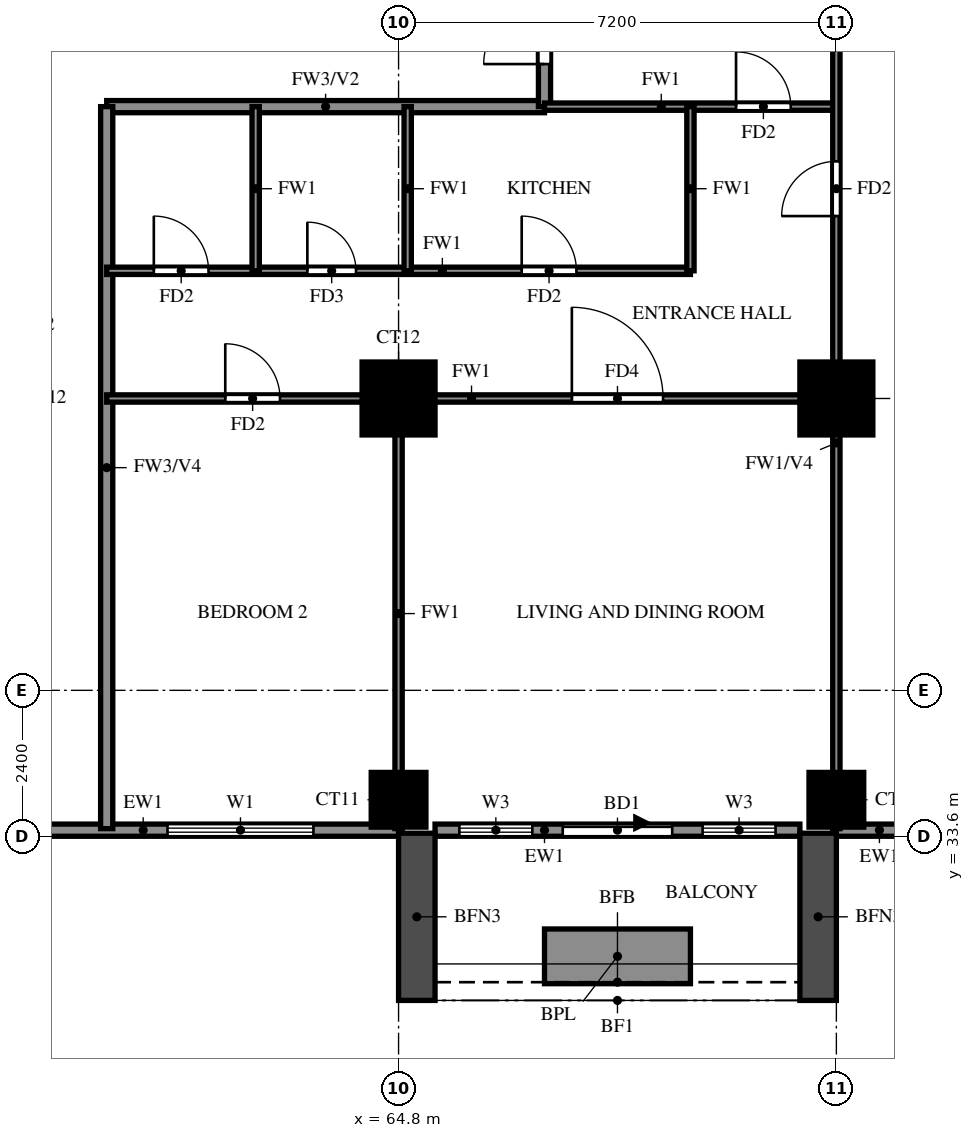
"""IFC4 building model, lengths in metres.
Left out: names, types, materials, properties, quantities, classifications, styles, units other than length and angle.
Written with IfcOpenShell. Run it as: python <this file> out.ifc"""

import sys

from ifc_helpers import new_model, si_unit, direction, frame, frame_2d, origin, origin_2d, place, context, subcontext, project, spatial, rectangle, extrude, source, transform, mapped, element, fill, save


model = new_model("IFC4")
c1 = context("Model", 3, precision=1e-05, world=origin(), true_north=direction((0.0, 1.0)))
c2 = subcontext(c1, "Body", "Model", "MODEL_VIEW")
j1 = project(units=[si_unit("LENGTHUNIT", "METRE"), si_unit("PLANEANGLEUNIT", "RADIAN")], contexts=[c1])
p1 = place(None, origin())
s1 = spatial("IfcSite", under=j1, at=p1, CompositionType="ELEMENT")
p2 = place(p1, origin())
s2 = spatial("IfcBuilding", under=s1, at=p2, CompositionType="ELEMENT")
p3 = place(p2, frame((0.0, 0.0, 93.5)))
s3 = spatial("IfcBuildingStorey", under=s2, at=p3, CompositionType="ELEMENT", Elevation=93.5)
m1 = source(origin(), c2, "Body", "SweptSolid", [
    extrude(rectangle(XDim=0.9, YDim=0.9, at=origin_2d()), origin(), (0.0, 0.0, 1.0), 3.18),
])
for number, where, z_axis, x_axis in (
    (1, (64.8, 34.2, 0.0), (0.0, 0.0, 1.0), (1.0, 0.0, 0.0)),
    (2, (72.0, 34.2, 0.0), (0.0, 0.0, 1.0), (1.0, 0.0, 0.0)),
):
    element("IfcColumn", number, at=place(p3, frame(where, z_axis=z_axis, x_axis=x_axis)), inside=s3, PredefinedType="COLUMN", context=c2, shape_type="MappedRepresentation", body=[
        mapped(m1, transform((0.0, 0.0, 0.0))),
    ])
m2 = source(origin(), c2, "Body", "SweptSolid", [
    extrude(rectangle(XDim=1.2, YDim=1.2, at=origin_2d()), origin(), (0.0, 0.0, 1.0), 3.18),
])
for number, where, z_axis, x_axis in (
    (3, (64.8, 40.8, 0.0), (0.0, 0.0, 1.0), (1.0, 0.0, 0.0)),
    (4, (72.0, 40.8, 0.0), (0.0, 0.0, 1.0), (1.0, 0.0, 0.0)),
):
    element("IfcColumn", number, at=place(p3, frame(where, z_axis=z_axis, x_axis=x_axis)), inside=s3, PredefinedType="COLUMN", context=c2, shape_type="MappedRepresentation", body=[
        mapped(m2, transform((0.0, 0.0, 0.0))),
    ])
p4 = place(p3, frame((85.996, 33.863, 0.0), z_axis=(0.0, 0.0, 1.0), x_axis=(-0.707100718496, 0.707112843825, 0.0)))
e5 = element("IfcWall", 5, at=p4, inside=s3, PredefinedType="SOLIDWALL", context=c2, shape_type="SweptSolid", body=[
    extrude(rectangle(XDim=20.135, YDim=0.2, at=frame_2d((10.067, 0.0))), origin(), (0.0, 0.0, 1.0), 3.18),
])
p5 = place(p3, frame((58.8, 33.7, 0.0), z_axis=(0.0, 0.0, 1.0), x_axis=(1.0, 0.0, 0.0)))
e6 = element("IfcWall", 6, at=p5, inside=s3, PredefinedType="SOLIDWALL", context=c2, shape_type="SweptSolid", body=[
    extrude(rectangle(XDim=6.0, YDim=0.2, at=frame_2d((3.0, 0.0))), origin(), (0.0, 0.0, 1.0), 3.18),
])
p6 = place(p5, frame((2.2, 0.0, 0.6)))
e7 = element("IfcOpeningElement", 7, at=p6, cuts=e6, PredefinedType="OPENING", context=c2, shape_type="SweptSolid", body=[
    extrude(rectangle(XDim=2.4, YDim=2.4, at=frame_2d((1.2, 1.2))), frame((0.0, 0.11, 0.0), z_axis=(0.0, -1.0, 0.0), x_axis=(1.0, 0.0, 0.0)), (0.0, 0.0, 1.0), 0.22),
])
p7 = place(p3, frame((65.4, 33.7, 0.0), z_axis=(0.0, 0.0, 1.0), x_axis=(1.0, 0.0, 0.0)))
e8 = element("IfcWall", 8, at=p7, inside=s3, PredefinedType="SOLIDWALL", context=c2, shape_type="SweptSolid", body=[
    extrude(rectangle(XDim=6.0, YDim=0.2, at=frame_2d((3.0, 0.0))), origin(), (0.0, 0.0, 1.0), 3.18),
])
p8 = place(p7, frame((2.1, 0.0, 0.0)))
e9 = element("IfcOpeningElement", 9, at=p8, cuts=e8, PredefinedType="OPENING", context=c2, shape_type="SweptSolid", body=[
    extrude(rectangle(XDim=1.8, YDim=2.4, at=frame_2d((0.9, 1.2))), frame((0.0, 0.11, 0.0), z_axis=(0.0, -1.0, 0.0), x_axis=(1.0, 0.0, 0.0)), (0.0, 0.0, 1.0), 0.22),
])
p9 = place(p7, frame((0.4, 0.0, 0.6)))
e10 = element("IfcOpeningElement", 10, at=p9, cuts=e8, PredefinedType="OPENING", context=c2, shape_type="SweptSolid", body=[
    extrude(rectangle(XDim=1.2, YDim=2.4, at=frame_2d((0.6, 1.2))), frame((0.0, 0.11, 0.0), z_axis=(0.0, -1.0, 0.0), x_axis=(1.0, 0.0, 0.0)), (0.0, 0.0, 1.0), 0.22),
])
p10 = place(p7, frame((4.4, 0.0, 0.6)))
e11 = element("IfcOpeningElement", 11, at=p10, cuts=e8, PredefinedType="OPENING", context=c2, shape_type="SweptSolid", body=[
    extrude(rectangle(XDim=1.2, YDim=2.4, at=frame_2d((0.6, 1.2))), frame((0.0, 0.11, 0.0), z_axis=(0.0, -1.0, 0.0), x_axis=(1.0, 0.0, 0.0)), (0.0, 0.0, 1.0), 0.22),
])
p11 = place(p3, frame((72.0, 33.7, 0.0), z_axis=(0.0, 0.0, 1.0), x_axis=(1.0, 0.0, 0.0)))
e12 = element("IfcWall", 12, at=p11, inside=s3, PredefinedType="SOLIDWALL", context=c2, shape_type="SweptSolid", body=[
    extrude(rectangle(XDim=14.159, YDim=0.2, at=frame_2d((7.079, 0.0))), origin(), (0.0, 0.0, 1.0), 3.18),
])
p12 = place(p11, frame((1.1, 0.0, 0.6)))
e13 = element("IfcOpeningElement", 13, at=p12, cuts=e12, PredefinedType="OPENING", context=c2, shape_type="SweptSolid", body=[
    extrude(rectangle(XDim=2.4, YDim=2.4, at=frame_2d((1.2, 1.2))), frame((0.0, 0.11, 0.0), z_axis=(0.0, -1.0, 0.0), x_axis=(1.0, 0.0, 0.0)), (0.0, 0.0, 1.0), 0.22),
])
p13 = place(p11, frame((4.1, 0.0, 0.6)))
e14 = element("IfcOpeningElement", 14, at=p13, cuts=e12, PredefinedType="OPENING", context=c2, shape_type="SweptSolid", body=[
    extrude(rectangle(XDim=2.4, YDim=2.4, at=frame_2d((1.2, 1.2))), frame((0.0, 0.11, 0.0), z_axis=(0.0, -1.0, 0.0), x_axis=(1.0, 0.0, 0.0)), (0.0, 0.0, 1.0), 0.22),
])
p14 = place(p11, frame((7.886, 0.0, 0.6)))
e15 = element("IfcOpeningElement", 15, at=p14, cuts=e12, PredefinedType="OPENING", context=c2, shape_type="SweptSolid", body=[
    extrude(rectangle(XDim=2.4, YDim=2.4, at=frame_2d((1.2, 1.2))), frame((0.0, 0.11, 0.0), z_axis=(0.0, -1.0, 0.0), x_axis=(1.0, 0.0, 0.0)), (0.0, 0.0, 1.0), 0.22),
])
p15 = place(p11, frame((10.872, 0.0, 0.6)))
e16 = element("IfcOpeningElement", 16, at=p15, cuts=e12, PredefinedType="OPENING", context=c2, shape_type="SweptSolid", body=[
    extrude(rectangle(XDim=2.4, YDim=2.4, at=frame_2d((1.2, 1.2))), frame((0.0, 0.11, 0.0), z_axis=(0.0, -1.0, 0.0), x_axis=(1.0, 0.0, 0.0)), (0.0, 0.0, 1.0), 0.22),
])
for number, where, z_axis, x_axis in (
    (17, (65.1, 33.65, 0.0), (0.0, 0.0, 1.0), (0.0, -1.0, 0.0)),
    (18, (71.7, 33.65, 0.0), (0.0, 0.0, 1.0), (0.0, -1.0, 0.0)),
):
    element("IfcWall", number, at=place(p3, frame(where, z_axis=z_axis, x_axis=x_axis)), inside=s3, PredefinedType="SOLIDWALL", context=c2, shape_type="SweptSolid", body=[
        extrude(rectangle(XDim=2.75, YDim=0.6, at=frame_2d((1.375, 0.0))), origin(), (0.0, 0.0, 1.0), 2.85),
    ])
p16 = place(p3, frame((67.2, 31.625, 0.0), z_axis=(0.0, 0.0, 1.0), x_axis=(1.0, 0.0, 0.0)))
e19 = element("IfcWall", 19, at=p16, inside=s3, PredefinedType="SOLIDWALL", context=c2, shape_type="SweptSolid", body=[
    extrude(rectangle(XDim=2.4, YDim=0.9, at=frame_2d((1.2, 0.0))), origin(), (0.0, 0.0, 1.0), 0.9),
])
p17 = place(p3, frame((60.0, 45.6, 0.0), z_axis=(0.0, 0.0, 1.0), x_axis=(1.0, 0.0, 0.0)))
e20 = element("IfcWall", 20, at=p17, inside=s3, PredefinedType="SOLIDWALL", context=c2, shape_type="SweptSolid", body=[
    extrude(rectangle(XDim=7.2, YDim=0.2, at=frame_2d((3.6, 0.0))), origin(), (0.0, 0.0, 1.0), 3.18),
])
p18 = place(p3, frame((60.0, 33.725, 0.0), z_axis=(0.0, 0.0, 1.0), x_axis=(0.0, 1.0, 0.0)))
e21 = element("IfcWall", 21, at=p18, inside=s3, PredefinedType="SOLIDWALL", context=c2, shape_type="SweptSolid", body=[
    extrude(rectangle(XDim=11.875, YDim=0.2, at=frame_2d((5.938, 0.0))), origin(), (0.0, 0.0, 1.0), 2.28),
])
p19 = place(p3, frame((67.2, 45.6, 0.0), z_axis=(0.0, 0.0, 1.0), x_axis=(0.0, 1.0, 0.0)))
e22 = element("IfcWall", 22, at=p19, inside=s3, PredefinedType="SOLIDWALL", context=c2, shape_type="SweptSolid", body=[
    extrude(rectangle(XDim=8.4, YDim=0.2, at=frame_2d((4.2, 0.0))), origin(), (0.0, 0.0, 1.0), 3.18),
])
p20 = place(p19, frame((0.7, 0.0, 0.0)))
e23 = element("IfcOpeningElement", 23, at=p20, cuts=e22, PredefinedType="OPENING", context=c2, shape_type="SweptSolid", body=[
    extrude(rectangle(XDim=1.0, YDim=2.1, at=frame_2d((0.5, 1.05))), frame((0.0, 0.11, 0.0), z_axis=(0.0, -1.0, 0.0), x_axis=(1.0, 0.0, 0.0)), (0.0, 0.0, 1.0), 0.22),
])
p21 = place(p3, frame((60.0, 40.8, 0.0), z_axis=(0.0, 0.0, 1.0), x_axis=(1.0, 0.0, 0.0)))
e24 = element("IfcWall", 24, at=p21, inside=s3, PredefinedType="PARTITIONING", context=c2, shape_type="SweptSolid", body=[
    extrude(rectangle(XDim=12.0, YDim=0.12, at=frame_2d((6.0, 0.0))), origin(), (0.0, 0.0, 1.0), 3.18),
])
p22 = place(p21, frame((7.65, 0.0, 0.0)))
e25 = element("IfcOpeningElement", 25, at=p22, cuts=e24, PredefinedType="OPENING", context=c2, shape_type="SweptSolid", body=[
    extrude(rectangle(XDim=1.5, YDim=2.1, at=frame_2d((0.75, 1.05))), frame((0.0, 0.07, 0.0), z_axis=(0.0, -1.0, 0.0), x_axis=(1.0, 0.0, 0.0)), (0.0, 0.0, 1.0), 0.14),
])
p23 = place(p21, frame((1.95, 0.0, 0.0)))
e26 = element("IfcOpeningElement", 26, at=p23, cuts=e24, PredefinedType="OPENING", context=c2, shape_type="SweptSolid", body=[
    extrude(rectangle(XDim=0.9, YDim=2.1, at=frame_2d((0.45, 1.05))), frame((0.0, 0.07, 0.0), z_axis=(0.0, -1.0, 0.0), x_axis=(1.0, 0.0, 0.0)), (0.0, 0.0, 1.0), 0.14),
])
p24 = place(p3, frame((60.0, 42.9, 0.0), z_axis=(0.0, 0.0, 1.0), x_axis=(1.0, 0.0, 0.0)))
e27 = element("IfcWall", 27, at=p24, inside=s3, PredefinedType="PARTITIONING", context=c2, shape_type="SweptSolid", body=[
    extrude(rectangle(XDim=9.6, YDim=0.12, at=frame_2d((4.8, 0.0))), origin(), (0.0, 0.0, 1.0), 3.18),
])
p25 = place(p24, frame((6.825, 0.0, 0.0)))
e28 = element("IfcOpeningElement", 28, at=p25, cuts=e27, PredefinedType="OPENING", context=c2, shape_type="SweptSolid", body=[
    extrude(rectangle(XDim=0.9, YDim=2.1, at=frame_2d((0.45, 1.05))), frame((0.0, 0.07, 0.0), z_axis=(0.0, -1.0, 0.0), x_axis=(1.0, 0.0, 0.0)), (0.0, 0.0, 1.0), 0.14),
])
p26 = place(p24, frame((3.3, 0.0, 0.0)))
e29 = element("IfcOpeningElement", 29, at=p26, cuts=e27, PredefinedType="OPENING", context=c2, shape_type="SweptSolid", body=[
    extrude(rectangle(XDim=0.8, YDim=2.1, at=frame_2d((0.4, 1.05))), frame((0.0, 0.07, 0.0), z_axis=(0.0, -1.0, 0.0), x_axis=(1.0, 0.0, 0.0)), (0.0, 0.0, 1.0), 0.14),
])
p27 = place(p24, frame((0.775, 0.0, 0.0)))
e30 = element("IfcOpeningElement", 30, at=p27, cuts=e27, PredefinedType="OPENING", context=c2, shape_type="SweptSolid", body=[
    extrude(rectangle(XDim=0.9, YDim=2.1, at=frame_2d((0.45, 1.05))), frame((0.0, 0.07, 0.0), z_axis=(0.0, -1.0, 0.0), x_axis=(1.0, 0.0, 0.0)), (0.0, 0.0, 1.0), 0.14),
])
p28 = place(p3, frame((67.2, 45.6, 0.0), z_axis=(0.0, 0.0, 1.0), x_axis=(1.0, 0.0, 0.0)))
e31 = element("IfcWall", 31, at=p28, inside=s3, PredefinedType="PARTITIONING", context=c2, shape_type="SweptSolid", body=[
    extrude(rectangle(XDim=4.8, YDim=0.12, at=frame_2d((2.4, 0.0))), origin(), (0.0, 0.0, 1.0), 3.18),
])
p29 = place(p28, frame((3.15, 0.0, 0.0)))
e32 = element("IfcOpeningElement", 32, at=p29, cuts=e31, PredefinedType="OPENING", context=c2, shape_type="SweptSolid", body=[
    extrude(rectangle(XDim=0.9, YDim=2.1, at=frame_2d((0.45, 1.05))), frame((0.0, 0.07, 0.0), z_axis=(0.0, -1.0, 0.0), x_axis=(1.0, 0.0, 0.0)), (0.0, 0.0, 1.0), 0.14),
])
p30 = place(p3, frame((62.45, 42.9, 0.0), z_axis=(0.0, 0.0, 1.0), x_axis=(0.0, 1.0, 0.0)))
e33 = element("IfcWall", 33, at=p30, inside=s3, PredefinedType="PARTITIONING", context=c2, shape_type="SweptSolid", body=[
    extrude(rectangle(XDim=2.7, YDim=0.12, at=frame_2d((1.35, 0.0))), origin(), (0.0, 0.0, 1.0), 3.18),
])
p31 = place(p3, frame((64.8, 33.725, 0.0), z_axis=(0.0, 0.0, 1.0), x_axis=(0.0, 1.0, 0.0)))
e34 = element("IfcWall", 34, at=p31, inside=s3, PredefinedType="PARTITIONING", context=c2, shape_type="SweptSolid", body=[
    extrude(rectangle(XDim=7.075, YDim=0.12, at=frame_2d((3.538, 0.0))), origin(), (0.0, 0.0, 1.0), 3.18),
])
for number, where, z_axis, x_axis in (
    (35, (64.95, 42.9, 0.0), (0.0, 0.0, 1.0), (0.0, 1.0, 0.0)),
    (36, (69.6, 42.9, 0.0), (0.0, 0.0, 1.0), (0.0, 1.0, 0.0)),
):
    element("IfcWall", number, at=place(p3, frame(where, z_axis=z_axis, x_axis=x_axis)), inside=s3, PredefinedType="PARTITIONING", context=c2, shape_type="SweptSolid", body=[
        extrude(rectangle(XDim=2.7, YDim=0.12, at=frame_2d((1.35, 0.0))), origin(), (0.0, 0.0, 1.0), 3.18),
    ])
p32 = place(p3, frame((72.0, 33.725, 0.0), z_axis=(0.0, 0.0, 1.0), x_axis=(0.0, 1.0, 0.0)))
e37 = element("IfcWall", 37, at=p32, inside=s3, PredefinedType="PARTITIONING", context=c2, shape_type="SweptSolid", body=[
    extrude(rectangle(XDim=14.098, YDim=0.12, at=frame_2d((7.049, 0.0))), origin(), (0.0, 0.0, 1.0), 2.28),
])
p33 = place(p32, frame((10.075, 0.0, 0.0)))
e38 = element("IfcOpeningElement", 38, at=p33, cuts=e37, PredefinedType="OPENING", context=c2, shape_type="SweptSolid", body=[
    extrude(rectangle(XDim=0.9, YDim=2.1, at=frame_2d((0.45, 1.05))), frame((0.0, 0.07, 0.0), z_axis=(0.0, -1.0, 0.0), x_axis=(1.0, 0.0, 0.0)), (0.0, 0.0, 1.0), 0.14),
])
p34 = place(p6, origin())
e39 = element("IfcWindow", 39, at=p34, inside=s3, PartitioningType="DOUBLE_PANEL_VERTICAL", PredefinedType="WINDOW", context=c2, shape_type="SweptSolid", body=[
    extrude(rectangle(XDim=2.4, YDim=2.4, at=frame_2d((1.2, 1.2))), frame((0.0, 0.03, 0.0), z_axis=(0.0, -1.0, 0.0), x_axis=(1.0, 0.0, 0.0)), (0.0, 0.0, 1.0), 0.06),
])
fill(e7, e39)
p35 = place(p8, origin())
e40 = element("IfcDoor", 40, at=p35, inside=s3, OperationType="DOUBLE_DOOR_SLIDING", PredefinedType="DOOR", context=c2, shape_type="SweptSolid", body=[
    extrude(rectangle(XDim=1.8, YDim=2.4, at=frame_2d((0.9, 1.2))), frame((0.0, 0.025, 0.0), z_axis=(0.0, -1.0, 0.0), x_axis=(1.0, 0.0, 0.0)), (0.0, 0.0, 1.0), 0.05),
])
fill(e9, e40)
p36 = place(p9, origin())
e41 = element("IfcWindow", 41, at=p36, inside=s3, PartitioningType="SINGLE_PANEL", PredefinedType="WINDOW", context=c2, shape_type="SweptSolid", body=[
    extrude(rectangle(XDim=1.2, YDim=2.4, at=frame_2d((0.6, 1.2))), frame((0.0, 0.03, 0.0), z_axis=(0.0, -1.0, 0.0), x_axis=(1.0, 0.0, 0.0)), (0.0, 0.0, 1.0), 0.06),
])
fill(e10, e41)
p37 = place(p10, origin())
e42 = element("IfcWindow", 42, at=p37, inside=s3, PartitioningType="SINGLE_PANEL", PredefinedType="WINDOW", context=c2, shape_type="SweptSolid", body=[
    extrude(rectangle(XDim=1.2, YDim=2.4, at=frame_2d((0.6, 1.2))), frame((0.0, 0.03, 0.0), z_axis=(0.0, -1.0, 0.0), x_axis=(1.0, 0.0, 0.0)), (0.0, 0.0, 1.0), 0.06),
])
fill(e11, e42)
p38 = place(p29, origin())
e43 = element("IfcDoor", 43, at=p38, inside=s3, OperationType="SINGLE_SWING_LEFT", PredefinedType="DOOR", context=c2, shape_type="SweptSolid", body=[
    extrude(rectangle(XDim=0.9, YDim=2.1, at=frame_2d((0.45, 1.05))), frame((0.0, 0.025, 0.0), z_axis=(0.0, -1.0, 0.0), x_axis=(1.0, 0.0, 0.0)), (0.0, 0.0, 1.0), 0.05),
])
fill(e32, e43)
p39 = place(p20, origin())
e44 = element("IfcDoor", 44, at=p39, inside=s3, OperationType="SINGLE_SWING_LEFT", PredefinedType="DOOR", context=c2, shape_type="SweptSolid", body=[
    extrude(rectangle(XDim=1.0, YDim=2.1, at=frame_2d((0.5, 1.05))), frame((0.0, 0.025, 0.0), z_axis=(0.0, -1.0, 0.0), x_axis=(1.0, 0.0, 0.0)), (0.0, 0.0, 1.0), 0.05),
])
fill(e23, e44)
p40 = place(p22, origin())
e45 = element("IfcDoor", 45, at=p40, inside=s3, OperationType="SINGLE_SWING_RIGHT", PredefinedType="DOOR", context=c2, shape_type="SweptSolid", body=[
    extrude(rectangle(XDim=1.5, YDim=2.1, at=frame_2d((0.75, 1.05))), frame((0.0, 0.025, 0.0), z_axis=(0.0, -1.0, 0.0), x_axis=(1.0, 0.0, 0.0)), (0.0, 0.0, 1.0), 0.05),
])
fill(e25, e45)
p41 = place(p23, origin())
e46 = element("IfcDoor", 46, at=p41, inside=s3, OperationType="SINGLE_SWING_LEFT", PredefinedType="DOOR", context=c2, shape_type="SweptSolid", body=[
    extrude(rectangle(XDim=0.9, YDim=2.1, at=frame_2d((0.45, 1.05))), frame((0.0, 0.025, 0.0), z_axis=(0.0, -1.0, 0.0), x_axis=(1.0, 0.0, 0.0)), (0.0, 0.0, 1.0), 0.05),
])
fill(e26, e46)
p42 = place(p25, origin())
e47 = element("IfcDoor", 47, at=p42, inside=s3, OperationType="SINGLE_SWING_LEFT", PredefinedType="DOOR", context=c2, shape_type="SweptSolid", body=[
    extrude(rectangle(XDim=0.9, YDim=2.1, at=frame_2d((0.45, 1.05))), frame((0.0, 0.025, 0.0), z_axis=(0.0, -1.0, 0.0), x_axis=(1.0, 0.0, 0.0)), (0.0, 0.0, 1.0), 0.05),
])
fill(e28, e47)
p43 = place(p26, origin())
e48 = element("IfcDoor", 48, at=p43, inside=s3, OperationType="SINGLE_SWING_RIGHT", PredefinedType="DOOR", context=c2, shape_type="SweptSolid", body=[
    extrude(rectangle(XDim=0.8, YDim=2.1, at=frame_2d((0.4, 1.05))), frame((0.0, 0.025, 0.0), z_axis=(0.0, -1.0, 0.0), x_axis=(1.0, 0.0, 0.0)), (0.0, 0.0, 1.0), 0.05),
])
fill(e29, e48)
p44 = place(p27, origin())
e49 = element("IfcDoor", 49, at=p44, inside=s3, OperationType="SINGLE_SWING_LEFT", PredefinedType="DOOR", context=c2, shape_type="SweptSolid", body=[
    extrude(rectangle(XDim=0.9, YDim=2.1, at=frame_2d((0.45, 1.05))), frame((0.0, 0.025, 0.0), z_axis=(0.0, -1.0, 0.0), x_axis=(1.0, 0.0, 0.0)), (0.0, 0.0, 1.0), 0.05),
])
fill(e30, e49)
p45 = place(p33, origin())
e50 = element("IfcDoor", 50, at=p45, inside=s3, OperationType="SINGLE_SWING_LEFT", PredefinedType="DOOR", context=c2, shape_type="SweptSolid", body=[
    extrude(rectangle(XDim=0.9, YDim=2.1, at=frame_2d((0.45, 1.05))), frame((0.0, 0.025, 0.0), z_axis=(0.0, -1.0, 0.0), x_axis=(1.0, 0.0, 0.0)), (0.0, 0.0, 1.0), 0.05),
])
fill(e38, e50)
save(model, sys.argv[1])
